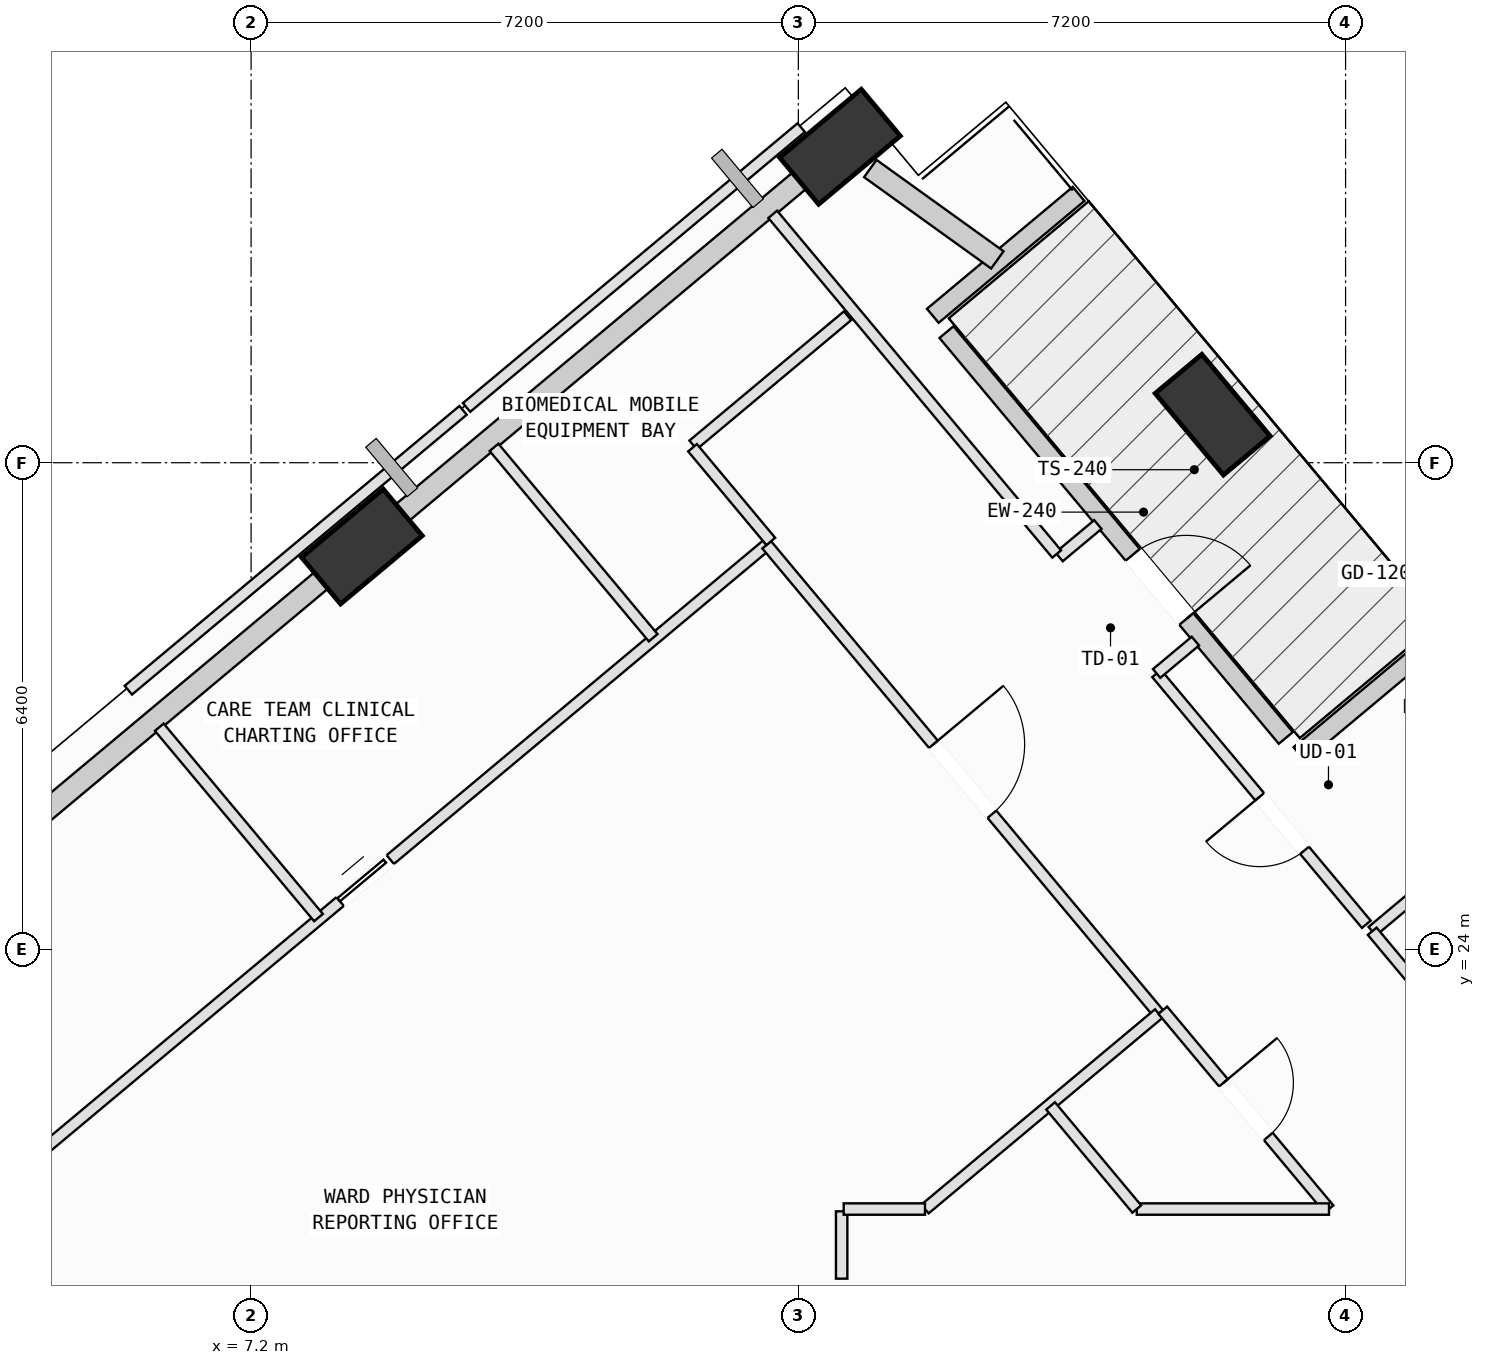
"""IFC4 building model, lengths in metres.
Left out: names, types, materials, properties, quantities, classifications, styles, units other than length and angle.
Written with IfcOpenShell. Run it as: python <this file> out.ifc"""

import sys

from ifc_helpers import new_model, si_unit, direction, frame, frame_2d, origin, origin_2d, place, context, subcontext, project, spatial, rectangle, extrude, element, fill, save


model = new_model("IFC4")
c1 = context("Model", 3, precision=1e-05, world=origin(), true_north=direction((0.0, 1.0)))
c2 = subcontext(c1, "Body", "Model", "MODEL_VIEW")
j1 = project(units=[si_unit("LENGTHUNIT", "METRE"), si_unit("PLANEANGLEUNIT", "RADIAN")], contexts=[c1])
p1 = place(None, origin())
s1 = spatial("IfcSite", under=j1, at=p1, CompositionType="ELEMENT")
p2 = place(p1, origin())
s2 = spatial("IfcBuilding", under=s1, at=p2, CompositionType="ELEMENT")
p3 = place(p2, frame((0.0, 0.0, 193.8)))
s3 = spatial("IfcBuildingStorey", under=s2, at=p3, CompositionType="ELEMENT", Elevation=193.8)
p4 = place(p3, frame((19.851, 31.032, 0.002), z_axis=(-0.025303350166, -0.057069724712, 0.998049491254), x_axis=(-0.276053399892, 0.959948355604, 0.047892326953)))
e1 = element("IfcColumn", 1, at=p4, inside=s3, PredefinedType="COLUMN", context=c2, shape_type="SweptSolid", body=[
    extrude(rectangle(XDim=1.4, YDim=0.8, at=origin_2d()), origin(), (0.0, 0.0, 1.0), 4.004),
])
p5 = place(p3, frame((14.948, 34.558, 0.002), z_axis=(-0.039619816067, -0.077352974227, 0.996216235339), x_axis=(0.97412520806, 0.219025688292, 0.055747886876)))
e2 = element("IfcColumn", 2, at=p5, inside=s3, PredefinedType="COLUMN", context=c2, shape_type="SweptSolid", body=[
    extrude(rectangle(XDim=1.4, YDim=0.8, at=origin_2d()), origin(), (0.0, 0.0, 1.0), 4.011),
])
p6 = place(p3, frame((8.657, 29.298, 0.002), z_axis=(-0.017680192528, -0.102982564722, 0.994526018843), x_axis=(0.864046115237, 0.498930874198, 0.067024573969)))
e3 = element("IfcColumn", 3, at=p6, inside=s3, PredefinedType="COLUMN", context=c2, shape_type="SweptSolid", body=[
    extrude(rectangle(XDim=1.4, YDim=0.8, at=origin_2d()), origin(), (0.0, 0.0, 1.0), 4.018),
])
p7 = place(p3, frame((16.349, 32.118, 0.0), z_axis=(0.0, 0.0, 1.0), x_axis=(0.64142910076, -0.767182317769, 0.0)))
e4 = element("IfcWall", 4, at=p7, inside=s3, PredefinedType="SOLIDWALL", context=c2, shape_type="SweptSolid", body=[
    extrude(rectangle(XDim=6.96, YDim=0.24, at=frame_2d((3.48, 0.0))), origin(), (0.0, 0.0, 1.0), 3.265),
])
p8 = place(p7, frame((3.82, 0.0, 0.0)))
e5 = element("IfcOpeningElement", 5, at=p8, cuts=e4, PredefinedType="OPENING", context=c2, shape_type="SweptSolid", body=[
    extrude(rectangle(XDim=1.1, YDim=2.15, at=frame_2d((0.55, 1.075))), frame((0.0, 0.13, 0.0), z_axis=(0.0, -1.0, 0.0), x_axis=(1.0, 0.0, 0.0)), (0.0, 0.0, 1.0), 0.26),
])
p9 = place(p3, frame((20.993, 26.564, 0.0), z_axis=(0.0, 0.0, 1.0), x_axis=(0.7671555128, 0.641461159526, 0.0)))
e6 = element("IfcWall", 6, at=p9, inside=s3, PredefinedType="SOLIDWALL", context=c2, shape_type="SweptSolid", body=[
    extrude(rectangle(XDim=2.5, YDim=0.24, at=frame_2d((1.25, 0.0))), origin(), (0.0, 0.0, 1.0), 3.265),
])
p10 = place(p3, frame((18.087, 33.937, 0.0), z_axis=(0.0, 0.0, 1.0), x_axis=(-0.767147639319, -0.641470575699, 0.0)))
e7 = element("IfcWall", 7, at=p10, inside=s3, PredefinedType="SOLIDWALL", context=c2, shape_type="SweptSolid", body=[
    extrude(rectangle(XDim=2.5, YDim=0.24, at=frame_2d((1.25, 0.0))), origin(), (0.0, 0.0, 1.0), 3.265),
])
p11 = place(p3, frame((15.347, 34.271, 0.0), z_axis=(0.0, 0.0, 1.0), x_axis=(0.811878353868, -0.58382663396, 0.0)))
e8 = element("IfcWall", 8, at=p11, inside=s3, PredefinedType="SOLIDWALL", context=c2, shape_type="SweptSolid", body=[
    extrude(rectangle(XDim=2.059, YDim=0.28, at=frame_2d((1.029, 0.0))), origin(), (0.0, 0.0, 1.0), 3.245),
])
p12 = place(p3, frame((8.901, 29.501, 0.0), z_axis=(0.0, 0.0, 1.0), x_axis=(0.767160246758, 0.641455497906, 0.0)))
e9 = element("IfcWall", 9, at=p12, inside=s3, PredefinedType="SOLIDWALL", context=c2, shape_type="SweptSolid", body=[
    extrude(rectangle(XDim=7.231, YDim=0.28, at=frame_2d((3.615, 0.0))), origin(), (0.0, 0.0, 1.0), 3.265),
])
p13 = place(p3, frame((2.591, 24.226, 0.0), z_axis=(0.0, 0.0, 1.0), x_axis=(0.767157694515, 0.641458550295, 0.0)))
e10 = element("IfcWall", 10, at=p13, inside=s3, PredefinedType="SOLIDWALL", context=c2, shape_type="SweptSolid", body=[
    extrude(rectangle(XDim=7.27, YDim=0.28, at=frame_2d((3.635, 0.0))), origin(), (0.0, 0.0, 1.0), 3.265),
])
p14 = place(p3, frame((14.97, 20.55, 0.0), z_axis=(0.0, 0.0, 1.0), x_axis=(0.0, -1.0, 0.0)))
e11 = element("IfcWall", 11, at=p14, inside=s3, PredefinedType="PARTITIONING", context=c2, shape_type="SweptSolid", body=[
    extrude(rectangle(XDim=0.886, YDim=0.15, at=frame_2d((0.443, 0.0))), origin(), (0.0, 0.0, 1.0), 3.78),
])
p15 = place(p3, frame((2.814, 19.98, 0.0), z_axis=(0.0, 0.0, 1.0), x_axis=(0.767178435157, 0.641433744537, 0.0)))
e12 = element("IfcWall", 12, at=p15, inside=s3, PredefinedType="PARTITIONING", context=c2, shape_type="SweptSolid", body=[
    extrude(rectangle(XDim=14.56, YDim=0.15, at=frame_2d((7.28, 0.0))), origin(), (0.0, 0.0, 1.0), 3.78),
])
p16 = place(p15, frame((7.244, 0.0, 0.0)))
e13 = element("IfcOpeningElement", 13, at=p16, cuts=e12, PredefinedType="OPENING", context=c2, shape_type="SweptSolid", body=[
    extrude(rectangle(XDim=0.86, YDim=2.06, at=frame_2d((0.43, 1.03))), frame((0.0, 0.085, 0.0), z_axis=(0.0, -1.0, 0.0), x_axis=(1.0, 0.0, 0.0)), (0.0, 0.0, 1.0), 0.17),
])
p17 = place(p3, frame((13.984, 29.319, 0.0), z_axis=(0.0, 0.0, 1.0), x_axis=(0.641434995705, -0.76717738906, 0.0)))
e14 = element("IfcWall", 14, at=p17, inside=s3, PredefinedType="PARTITIONING", context=c2, shape_type="SweptSolid", body=[
    extrude(rectangle(XDim=8.04, YDim=0.15, at=frame_2d((4.02, 0.0))), origin(), (0.0, 0.0, 1.0), 3.78),
])
p18 = place(p17, frame((3.42, 0.0, 0.0)))
e15 = element("IfcOpeningElement", 15, at=p18, cuts=e14, PredefinedType="OPENING", context=c2, shape_type="SweptSolid", body=[
    extrude(rectangle(XDim=1.2, YDim=2.15, at=frame_2d((0.6, 1.075))), frame((0.0, 0.085, 0.0), z_axis=(0.0, -1.0, 0.0), x_axis=(1.0, 0.0, 0.0)), (0.0, 0.0, 1.0), 0.17),
])
p19 = place(p3, frame((19.141, 23.151, 0.0), z_axis=(0.0, 0.0, 1.0), x_axis=(-0.767221821243, -0.64138184961, 0.0)))
e16 = element("IfcWall", 16, at=p19, inside=s3, PredefinedType="PARTITIONING", context=c2, shape_type="SweptSolid", body=[
    extrude(rectangle(XDim=4.008, YDim=0.15, at=frame_2d((2.004, 0.0))), origin(), (0.0, 0.0, 1.0), 3.78),
])
p20 = place(p3, frame((16.066, 20.58, 0.0), z_axis=(0.0, 0.0, 1.0), x_axis=(-1.0, 0.0, 0.0)))
e17 = element("IfcWall", 17, at=p20, inside=s3, PredefinedType="PARTITIONING", context=c2, shape_type="SweptSolid", body=[
    extrude(rectangle(XDim=1.069, YDim=0.15, at=frame_2d((0.534, 0.0))), origin(), (0.0, 0.0, 1.0), 3.78),
])
p21 = place(p3, frame((21.95, 24.235, 0.0), z_axis=(0.0, 0.0, 1.0), x_axis=(0.767141544005, 0.641477865137, 0.0)))
e18 = element("IfcWall", 18, at=p21, inside=s3, PredefinedType="PARTITIONING", context=c2, shape_type="SweptSolid", body=[
    extrude(rectangle(XDim=2.635, YDim=0.15, at=frame_2d((1.317, 0.0))), origin(), (0.0, 0.0, 1.0), 3.78),
])
p22 = place(p3, frame((25.006, 20.58, 0.0), z_axis=(0.0, 0.0, 1.0), x_axis=(-0.641458710036, 0.767157560948, 0.0)))
e19 = element("IfcWall", 19, at=p22, inside=s3, PredefinedType="PARTITIONING", context=c2, shape_type="SweptSolid", body=[
    extrude(rectangle(XDim=4.764, YDim=0.15, at=frame_2d((2.382, 0.0))), origin(), (0.0, 0.0, 1.0), 3.415),
])
p23 = place(p22, frame((1.882, 0.0, 0.0)))
e20 = element("IfcOpeningElement", 20, at=p23, cuts=e19, PredefinedType="OPENING", context=c2, shape_type="SweptSolid", body=[
    extrude(rectangle(XDim=1.0, YDim=2.12, at=frame_2d((0.5, 1.06))), frame((0.0, 0.085, 0.0), z_axis=(0.0, -1.0, 0.0), x_axis=(1.0, 0.0, 0.0)), (0.0, 0.0, 1.0), 0.17),
])
p24 = place(p3, frame((21.873, 24.327, 0.0), z_axis=(0.0, 0.0, 1.0), x_axis=(-0.641417353463, 0.767192139347, 0.0)))
e21 = element("IfcWall", 21, at=p24, inside=s3, PredefinedType="PARTITIONING", context=c2, shape_type="SweptSolid", body=[
    extrude(rectangle(XDim=4.302, YDim=0.15, at=frame_2d((2.151, 0.0))), origin(), (0.0, 0.0, 1.0), 3.78),
])
p25 = place(p24, frame((1.268, 0.0, 0.0)))
e22 = element("IfcOpeningElement", 22, at=p25, cuts=e21, PredefinedType="OPENING", context=c2, shape_type="SweptSolid", body=[
    extrude(rectangle(XDim=0.92, YDim=2.1, at=frame_2d((0.46, 1.05))), frame((0.0, 0.085, 0.0), z_axis=(0.0, -1.0, 0.0), x_axis=(1.0, 0.0, 0.0)), (0.0, 0.0, 1.0), 0.17),
])
for number, where, z_axis, x_axis in (
    (23, (19.114, 27.627, 0.0), (0.0, 0.0, 1.0), (0.767, 0.641, 0.0)),
    (24, (18.341, 29.587, 0.0), (0.0, 0.0, 1.0), (-0.767, -0.641, 0.0)),
):
    element("IfcWall", number, at=place(p3, frame(where, z_axis=z_axis, x_axis=x_axis)), inside=s3, PredefinedType="PARTITIONING", context=c2, shape_type="SweptSolid", body=[
        extrude(rectangle(XDim=0.665, YDim=0.15, at=frame_2d((0.332, 0.0))), origin(), (0.0, 0.0, 1.0), 3.78),
    ])
p26 = place(p3, frame((17.799, 29.199, 0.0), z_axis=(0.0, 0.0, 1.0), x_axis=(-0.641391521351, 0.76721373576, 0.0)))
e25 = element("IfcWall", 25, at=p26, inside=s3, PredefinedType="PARTITIONING", context=c2, shape_type="SweptSolid", body=[
    extrude(rectangle(XDim=5.825, YDim=0.15, at=frame_2d((2.913, 0.0))), origin(), (0.0, 0.0, 1.0), 3.78),
])
p27 = place(p3, frame((14.326, 34.285, 0.0), z_axis=(0.0, 0.0, 1.0), x_axis=(0.767171367741, 0.641442197333, 0.0)))
e26 = element("IfcWall", 26, at=p27, inside=s3, PredefinedType="PARTITIONING", context=c2, shape_type="SweptSolid", body=[
    extrude(rectangle(XDim=1.202, YDim=0.15, at=frame_2d((0.601, 0.0))), origin(), (0.0, 0.0, 1.0), 3.265),
])
p28 = place(p3, frame((5.585, 27.407, 0.0), z_axis=(0.0, 0.0, 1.0), x_axis=(0.767184932012, 0.641425973979, 0.0)))
e27 = element("IfcWall", 27, at=p28, inside=s3, PredefinedType="PARTITIONING", context=c2, shape_type="SweptSolid", body=[
    extrude(rectangle(XDim=5.74, YDim=0.15, at=frame_2d((2.87, 0.0))), origin(), (0.0, 0.0, 1.0), 3.78),
])
p29 = place(p3, frame((10.396, 30.602, 0.0), z_axis=(0.0, 0.0, 1.0), x_axis=(0.64133838639, -0.76725815352, 0.0)))
e28 = element("IfcWall", 28, at=p29, inside=s3, PredefinedType="PARTITIONING", context=c2, shape_type="SweptSolid", body=[
    extrude(rectangle(XDim=3.265, YDim=0.15, at=frame_2d((1.633, 0.0))), origin(), (0.0, 0.0, 1.0), 3.78),
])
p30 = place(p3, frame((8.087, 24.415, 0.0), z_axis=(0.0, 0.0, 1.0), x_axis=(-0.641551201233, 0.767080214969, 0.0)))
e29 = element("IfcWall", 29, at=p30, inside=s3, PredefinedType="PARTITIONING", context=c2, shape_type="SweptSolid", body=[
    extrude(rectangle(XDim=3.265, YDim=0.15, at=frame_2d((1.633, 0.0))), origin(), (0.0, 0.0, 1.0), 3.78),
])
p31 = place(p3, frame((15.048, 32.334, 0.0), z_axis=(0.0, 0.0, 1.0), x_axis=(-0.76717824492, -0.641433972067, 0.0)))
e30 = element("IfcWall", 30, at=p31, inside=s3, PredefinedType="PARTITIONING", context=c2, shape_type="SweptSolid", body=[
    extrude(rectangle(XDim=2.65, YDim=0.15, at=frame_2d((1.325, 0.0))), origin(), (0.0, 0.0, 1.0), 3.78),
])
p32 = place(p3, frame((13.008, 30.597, 0.0), z_axis=(0.0, 0.0, 1.0), x_axis=(0.64114053574, -0.767423490279, 0.0)))
e31 = element("IfcWall", 31, at=p32, inside=s3, PredefinedType="PARTITIONING", context=c2, shape_type="SweptSolid", body=[
    extrude(rectangle(XDim=1.606, YDim=0.15, at=frame_2d((0.803, 0.0))), origin(), (0.0, 0.0, 1.0), 3.78),
])
p33 = place(p3, frame((19.195, 23.196, 0.0), z_axis=(0.0, 0.0, 1.0), x_axis=(0.641401985735, -0.767204987402, 0.0)))
e32 = element("IfcWall", 32, at=p33, inside=s3, PredefinedType="PARTITIONING", context=c2, shape_type="SweptSolid", body=[
    extrude(rectangle(XDim=3.41, YDim=0.15, at=frame_2d((1.705, 0.0))), origin(), (0.0, 0.0, 1.0), 3.78),
])
p34 = place(p33, frame((1.245, 0.0, 0.0)))
e33 = element("IfcOpeningElement", 33, at=p34, cuts=e32, PredefinedType="OPENING", context=c2, shape_type="SweptSolid", body=[
    extrude(rectangle(XDim=0.92, YDim=2.1, at=frame_2d((0.46, 1.05))), frame((0.0, 0.085, 0.0), z_axis=(0.0, -1.0, 0.0), x_axis=(1.0, 0.0, 0.0)), (0.0, 0.0, 1.0), 0.17),
])
p35 = place(p3, frame((21.382, 20.58, 0.0), z_axis=(0.0, 0.0, 1.0), x_axis=(-1.0, 0.0, 0.0)))
e34 = element("IfcWall", 34, at=p35, inside=s3, PredefinedType="PARTITIONING", context=c2, shape_type="SweptSolid", body=[
    extrude(rectangle(XDim=2.529, YDim=0.15, at=frame_2d((1.265, 0.0))), origin(), (0.0, 0.0, 1.0), 3.78),
])
p36 = place(p3, frame((18.853, 20.58, 0.0), z_axis=(0.0, 0.0, 1.0), x_axis=(-0.641270101846, 0.767315226278, 0.0)))
e35 = element("IfcWall", 35, at=p36, inside=s3, PredefinedType="PARTITIONING", context=c2, shape_type="SweptSolid", body=[
    extrude(rectangle(XDim=1.768, YDim=0.15, at=frame_2d((0.884, 0.0))), origin(), (0.0, 0.0, 1.0), 3.78),
])
p37 = place(p3, frame((10.035, 31.127, 0.0), z_axis=(0.0, 0.0, 1.0), x_axis=(0.767114927552, 0.641509694336, 0.0)))
e36 = element("IfcWall", 36, at=p37, inside=s3, PredefinedType="PARTITIONING", context=c2, shape_type="SweptSolid", body=[
    extrude(rectangle(XDim=5.74, YDim=0.15, at=frame_2d((2.87, 0.0))), origin(), (0.0, 0.0, 1.0), 3.78),
])
p38 = place(p8, origin())
e37 = element("IfcDoor", 37, at=p38, inside=s3, OperationType="SINGLE_SWING_RIGHT", PredefinedType="DOOR", context=c2, shape_type="SweptSolid", body=[
    extrude(rectangle(XDim=1.1, YDim=2.15, at=frame_2d((0.55, 1.075))), frame((0.0, 0.025, 0.0), z_axis=(0.0, -1.0, 0.0), x_axis=(1.0, 0.0, 0.0)), (0.0, 0.0, 1.0), 0.05),
])
fill(e5, e37)
p39 = place(p18, origin())
e38 = element("IfcDoor", 38, at=p39, inside=s3, OperationType="SINGLE_SWING_LEFT", PredefinedType="DOOR", context=c2, shape_type="SweptSolid", body=[
    extrude(rectangle(XDim=1.2, YDim=2.15, at=frame_2d((0.6, 1.075))), frame((0.0, 0.025, 0.0), z_axis=(0.0, -1.0, 0.0), x_axis=(1.0, 0.0, 0.0)), (0.0, 0.0, 1.0), 0.05),
])
fill(e15, e38)
p40 = place(p25, origin())
e39 = element("IfcDoor", 39, at=p40, inside=s3, OperationType="SINGLE_SWING_RIGHT", PredefinedType="DOOR", context=c2, shape_type="SweptSolid", body=[
    extrude(rectangle(XDim=0.92, YDim=2.1, at=frame_2d((0.46, 1.05))), frame((0.0, 0.025, 0.0), z_axis=(0.0, -1.0, 0.0), x_axis=(1.0, 0.0, 0.0)), (0.0, 0.0, 1.0), 0.05),
])
fill(e22, e39)
p41 = place(p34, origin())
e40 = element("IfcDoor", 40, at=p41, inside=s3, OperationType="SINGLE_SWING_LEFT", PredefinedType="DOOR", context=c2, shape_type="SweptSolid", body=[
    extrude(rectangle(XDim=0.92, YDim=2.1, at=frame_2d((0.46, 1.05))), frame((0.0, 0.025, 0.0), z_axis=(0.0, -1.0, 0.0), x_axis=(1.0, 0.0, 0.0)), (0.0, 0.0, 1.0), 0.05),
])
fill(e33, e40)
p42 = place(p16, origin())
e41 = element("IfcDoor", 41, at=p42, inside=s3, OperationType="SLIDING_TO_LEFT", PredefinedType="DOOR", context=c2, shape_type="SweptSolid", body=[
    extrude(rectangle(XDim=0.86, YDim=2.06, at=frame_2d((0.43, 1.03))), frame((0.0, 0.025, 0.0), z_axis=(0.0, -1.0, 0.0), x_axis=(1.0, 0.0, 0.0)), (0.0, 0.0, 1.0), 0.05),
])
fill(e13, e41)
save(model, sys.argv[1])
